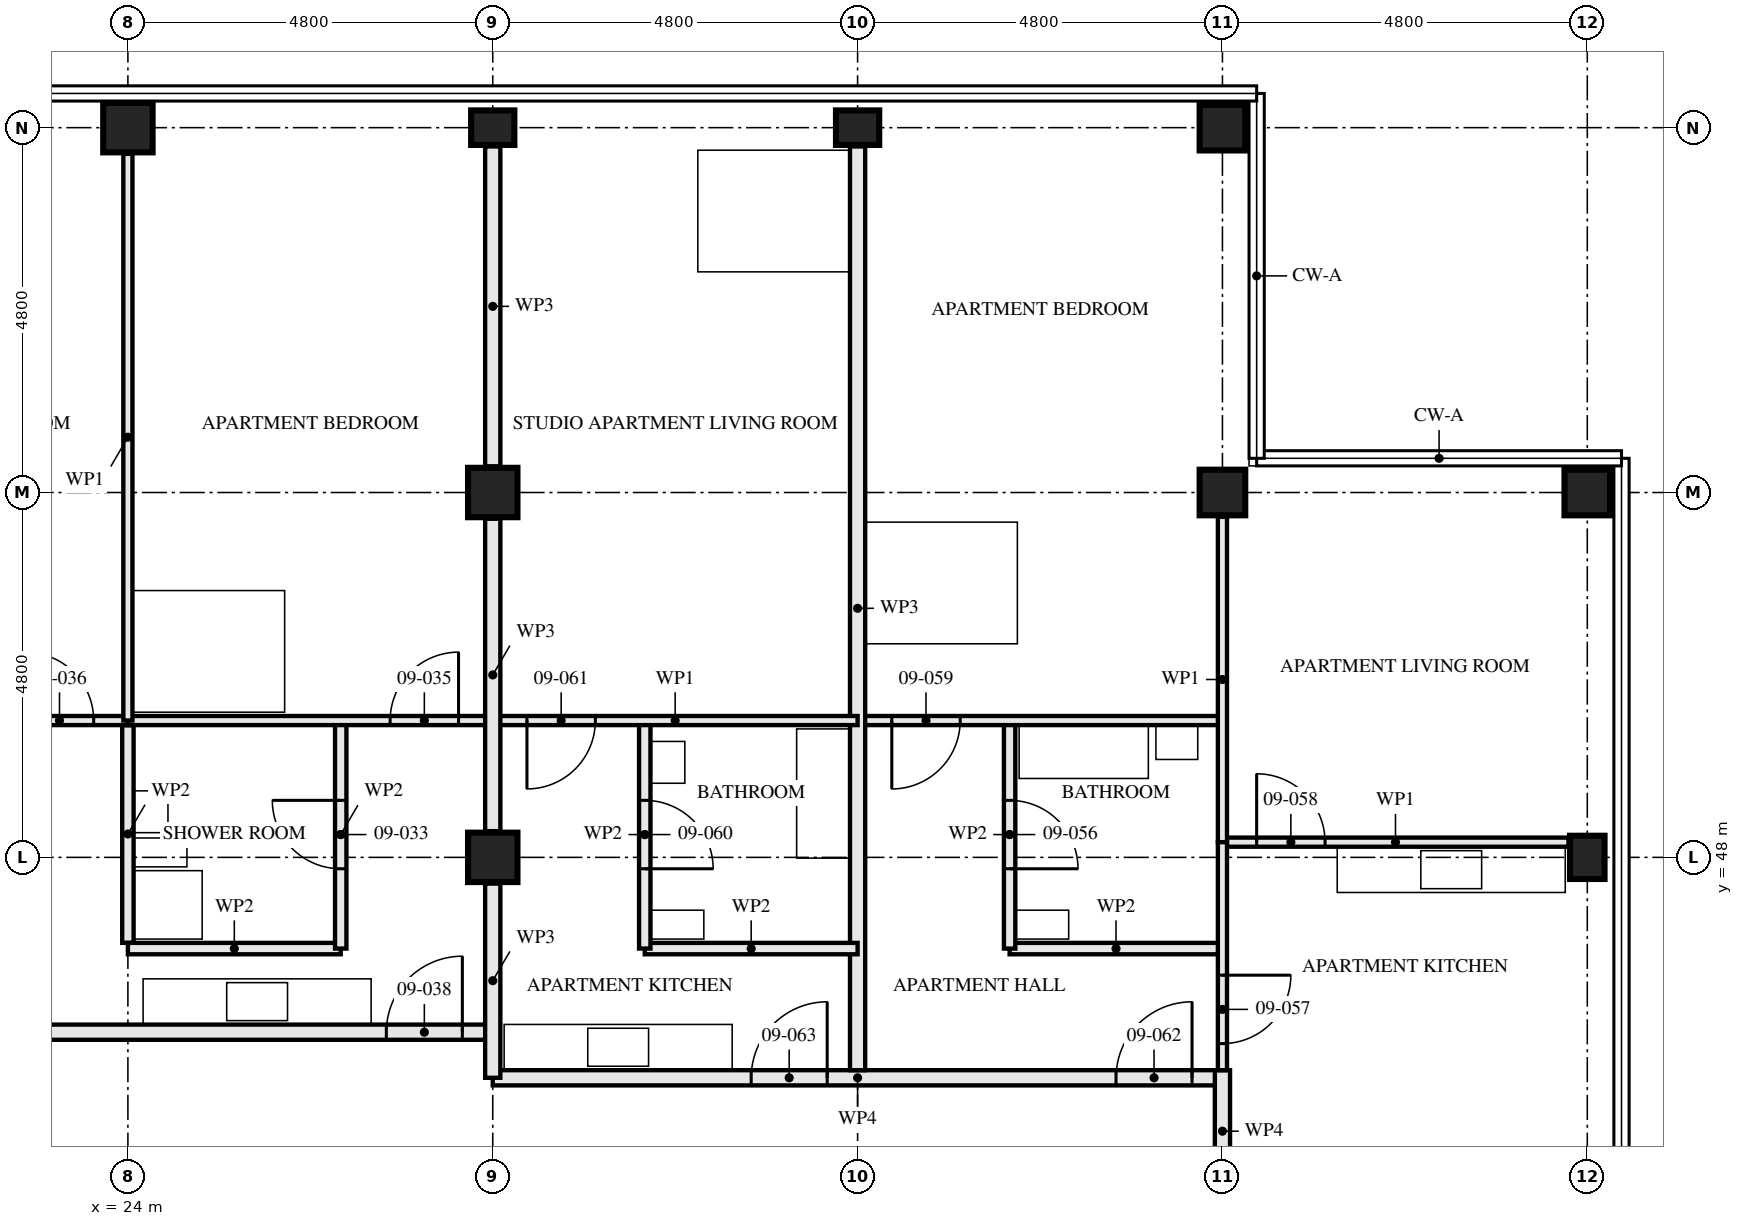
"""IFC4 building model, lengths in metres.
Left out: names, types, materials, properties, quantities, classifications, styles, units other than length and angle.
Written with IfcOpenShell. Run it as: python <this file> out.ifc"""

import sys

from ifc_helpers import new_model, si_unit, direction, frame, frame_2d, origin, origin_2d, place, context, subcontext, project, spatial, rectangle, hollow_rectangle, i_section, extrude, element, fill, save


model = new_model("IFC4")
c1 = context("Model", 3, precision=1e-05, world=origin(), true_north=direction((0.0, 1.0)))
c2 = subcontext(c1, "Body", "Model", "MODEL_VIEW")
j1 = project(units=[si_unit("LENGTHUNIT", "METRE"), si_unit("PLANEANGLEUNIT", "RADIAN")], contexts=[c1])
p1 = place(None, origin())
s1 = spatial("IfcSite", under=j1, at=p1, CompositionType="ELEMENT")
p2 = place(p1, origin())
s2 = spatial("IfcBuilding", under=s1, at=p2, CompositionType="ELEMENT")
p3 = place(p2, frame((0.0, 0.0, 37.5)))
s3 = spatial("IfcBuildingStorey", under=s2, at=p3, CompositionType="ELEMENT", Elevation=37.5)
p4 = place(p3, frame((24.0, 57.6, 0.0), z_axis=(0.0, 0.0, 1.0), x_axis=(0.0, 1.0, 0.0)))
e1 = element("IfcColumn", 1, at=p4, inside=s3, PredefinedType="COLUMN", context=c2, shape_type="SweptSolid", body=[
    extrude(hollow_rectangle(XDim=0.65, YDim=0.65, WallThickness=0.08, at=origin_2d()), origin(), (0.0, 0.0, 1.0), 3.5),
])
for number, where, z_axis, x_axis in (
    (2, (28.8, 48.0, 0.0), (0.0, 0.0, 1.0), (1.0, 0.0, 0.0)),
    (3, (28.8, 52.8, 0.0), (0.0, 0.0, 1.0), (1.0, 0.0, 0.0)),
):
    element("IfcColumn", number, at=place(p3, frame(where, z_axis=z_axis, x_axis=x_axis)), inside=s3, PredefinedType="COLUMN", context=c2, shape_type="SweptSolid", body=[
        extrude(hollow_rectangle(XDim=0.65, YDim=0.65, WallThickness=0.05, at=origin_2d()), origin(), (0.0, 0.0, 1.0), 3.5),
    ])
for number, where, z_axis, x_axis in (
    (4, (28.8, 57.6, 0.0), (0.0, 0.0, 1.0), (0.0, 1.0, 0.0)),
    (5, (33.6, 57.6, 0.0), (0.0, 0.0, 1.0), (0.0, 1.0, 0.0)),
):
    element("IfcColumn", number, at=place(p3, frame(where, z_axis=z_axis, x_axis=x_axis)), inside=s3, PredefinedType="COLUMN", context=c2, shape_type="SweptSolid", body=[
        extrude(i_section(OverallWidth=0.454, OverallDepth=0.569, WebThickness=0.078, FlangeThickness=0.125, FilletRadius=0.015, at=origin_2d()), origin(), (0.0, 0.0, 1.0), 3.5),
    ])
for number, where, z_axis, x_axis in (
    (6, (38.4, 52.8, 0.0), (0.0, 0.0, 1.0), (0.0, 1.0, 0.0)),
    (7, (38.4, 57.6, 0.0), (0.0, 0.0, 1.0), (0.0, 1.0, 0.0)),
):
    element("IfcColumn", number, at=place(p3, frame(where, z_axis=z_axis, x_axis=x_axis)), inside=s3, PredefinedType="COLUMN", context=c2, shape_type="SweptSolid", body=[
        extrude(hollow_rectangle(XDim=0.6, YDim=0.6, WallThickness=0.05, at=origin_2d()), origin(), (0.0, 0.0, 1.0), 3.5),
    ])
p5 = place(p3, frame((43.2, 48.0, 0.0), z_axis=(0.0, 0.0, 1.0), x_axis=(1.0, 0.0, 0.0)))
e8 = element("IfcColumn", 8, at=p5, inside=s3, PredefinedType="COLUMN", context=c2, shape_type="SweptSolid", body=[
    extrude(i_section(OverallWidth=0.454, OverallDepth=0.569, WebThickness=0.078, FlangeThickness=0.125, FilletRadius=0.015, at=origin_2d()), origin(), (0.0, 0.0, 1.0), 3.5),
])
p6 = place(p3, frame((43.2, 52.8, 0.0), z_axis=(0.0, 0.0, 1.0), x_axis=(0.0, 1.0, 0.0)))
e9 = element("IfcColumn", 9, at=p6, inside=s3, PredefinedType="COLUMN", context=c2, shape_type="SweptSolid", body=[
    extrude(hollow_rectangle(XDim=0.6, YDim=0.6, WallThickness=0.05, at=origin_2d()), origin(), (0.0, 0.0, 1.0), 3.5),
])
p7 = place(p3, frame((26.8, 49.8, 0.0), z_axis=(0.0, 0.0, 1.0), x_axis=(0.0, -1.0, 0.0)))
e10 = element("IfcWall", 10, at=p7, inside=s3, PredefinedType="PARTITIONING", context=c2, shape_type="SweptSolid", body=[
    extrude(rectangle(XDim=3.0, YDim=0.15, at=frame_2d((1.5, 0.0))), origin(), (0.0, 0.0, 1.0), 2.55),
])
p8 = place(p7, frame((1.05, 0.0, 0.0)))
e11 = element("IfcOpeningElement", 11, at=p8, cuts=e10, PredefinedType="OPENING", context=c2, shape_type="SweptSolid", body=[
    extrude(rectangle(XDim=0.9, YDim=2.1, at=frame_2d((0.45, 1.05))), frame((0.0, 0.085, 0.0), z_axis=(0.0, -1.0, 0.0), x_axis=(1.0, 0.0, 0.0)), (0.0, 0.0, 1.0), 0.171),
])
p9 = place(p3, frame((26.8, 46.8, 0.0), z_axis=(0.0, 0.0, 1.0), x_axis=(-1.0, 0.0, 0.0)))
e12 = element("IfcWall", 12, at=p9, inside=s3, PredefinedType="PARTITIONING", context=c2, shape_type="SweptSolid", body=[
    extrude(rectangle(XDim=2.8, YDim=0.15, at=frame_2d((1.4, 0.0))), origin(), (0.0, 0.0, 1.0), 3.33),
])
p10 = place(p3, frame((28.8, 49.8, 0.0), z_axis=(0.0, 0.0, 1.0), x_axis=(-1.0, 0.0, 0.0)))
e13 = element("IfcWall", 13, at=p10, inside=s3, PredefinedType="PARTITIONING", context=c2, shape_type="SweptSolid", body=[
    extrude(rectangle(XDim=4.8, YDim=0.12, at=frame_2d((2.4, 0.0))), origin(), (0.0, 0.0, 1.0), 3.33),
])
p11 = place(p10, frame((0.45, 0.0, 0.0)))
e14 = element("IfcOpeningElement", 14, at=p11, cuts=e13, PredefinedType="OPENING", context=c2, shape_type="SweptSolid", body=[
    extrude(rectangle(XDim=0.9, YDim=2.1, at=frame_2d((0.45, 1.05))), frame((0.0, 0.071, 0.0), z_axis=(0.0, -1.0, 0.0), x_axis=(1.0, 0.0, 0.0)), (0.0, 0.0, 1.0), 0.141),
])
p12 = place(p3, frame((24.0, 49.8, 0.0), z_axis=(0.0, 0.0, 1.0), x_axis=(-1.0, 0.0, 0.0)))
e15 = element("IfcWall", 15, at=p12, inside=s3, PredefinedType="PARTITIONING", context=c2, shape_type="SweptSolid", body=[
    extrude(rectangle(XDim=4.8, YDim=0.12, at=frame_2d((2.4, 0.0))), origin(), (0.0, 0.0, 1.0), 3.33),
])
p13 = place(p12, frame((0.45, 0.0, 0.0)))
e16 = element("IfcOpeningElement", 16, at=p13, cuts=e15, PredefinedType="OPENING", context=c2, shape_type="SweptSolid", body=[
    extrude(rectangle(XDim=0.9, YDim=2.1, at=frame_2d((0.45, 1.05))), frame((0.0, 0.071, 0.0), z_axis=(0.0, -1.0, 0.0), x_axis=(1.0, 0.0, 0.0)), (0.0, 0.0, 1.0), 0.141),
])
p14 = place(p3, frame((24.0, 57.255, 0.0), z_axis=(0.0, 0.0, 1.0), x_axis=(0.0, -1.0, 0.0)))
e17 = element("IfcWall", 17, at=p14, inside=s3, PredefinedType="PARTITIONING", context=c2, shape_type="SweptSolid", body=[
    extrude(rectangle(XDim=7.455, YDim=0.12, at=frame_2d((3.728, 0.0))), origin(), (0.0, 0.0, 1.0), 2.55),
])
p15 = place(p3, frame((28.8, 45.7, 0.0), z_axis=(0.0, 0.0, 1.0), x_axis=(-1.0, 0.0, 0.0)))
e18 = element("IfcWall", 18, at=p15, inside=s3, PredefinedType="PARTITIONING", context=c2, shape_type="SweptSolid", body=[
    extrude(rectangle(XDim=14.4, YDim=0.2, at=frame_2d((7.2, 0.0))), origin(), (0.0, 0.0, 1.0), 3.33),
])
p16 = place(p15, frame((0.4, 0.0, 0.0)))
e19 = element("IfcOpeningElement", 19, at=p16, cuts=e18, PredefinedType="OPENING", context=c2, shape_type="SweptSolid", body=[
    extrude(rectangle(XDim=1.0, YDim=2.1, at=frame_2d((0.5, 1.05))), frame((0.0, 0.111, 0.0), z_axis=(0.0, -1.0, 0.0), x_axis=(1.0, 0.0, 0.0)), (0.0, 0.0, 1.0), 0.221),
])
p17 = place(p3, frame((35.6, 49.8, 0.0), z_axis=(0.0, 0.0, 1.0), x_axis=(0.0, -1.0, 0.0)))
e20 = element("IfcWall", 20, at=p17, inside=s3, PredefinedType="PARTITIONING", context=c2, shape_type="SweptSolid", body=[
    extrude(rectangle(XDim=3.0, YDim=0.15, at=frame_2d((1.5, 0.0))), origin(), (0.0, 0.0, 1.0), 2.55),
])
p18 = place(p17, frame((1.05, 0.0, 0.0)))
e21 = element("IfcOpeningElement", 21, at=p18, cuts=e20, PredefinedType="OPENING", context=c2, shape_type="SweptSolid", body=[
    extrude(rectangle(XDim=0.9, YDim=2.1, at=frame_2d((0.45, 1.05))), frame((0.0, 0.085, 0.0), z_axis=(0.0, -1.0, 0.0), x_axis=(1.0, 0.0, 0.0)), (0.0, 0.0, 1.0), 0.171),
])
p19 = place(p3, frame((38.4, 46.8, 0.0), z_axis=(0.0, 0.0, 1.0), x_axis=(-1.0, 0.0, 0.0)))
e22 = element("IfcWall", 22, at=p19, inside=s3, PredefinedType="PARTITIONING", context=c2, shape_type="SweptSolid", body=[
    extrude(rectangle(XDim=2.8, YDim=0.15, at=frame_2d((1.4, 0.0))), origin(), (0.0, 0.0, 1.0), 3.33),
])
p20 = place(p3, frame((38.4, 48.2, 0.0), z_axis=(0.0, 0.0, 1.0), x_axis=(0.0, -1.0, 0.0)))
e23 = element("IfcWall", 23, at=p20, inside=s3, PredefinedType="PARTITIONING", context=c2, shape_type="SweptSolid", body=[
    extrude(rectangle(XDim=3.0, YDim=0.12, at=frame_2d((1.5, 0.0))), origin(), (0.0, 0.0, 1.0), 2.55),
])
p21 = place(p20, frame((1.75, 0.0, 0.0)))
e24 = element("IfcOpeningElement", 24, at=p21, cuts=e23, PredefinedType="OPENING", context=c2, shape_type="SweptSolid", body=[
    extrude(rectangle(XDim=0.9, YDim=2.1, at=frame_2d((0.45, 1.05))), frame((0.0, 0.071, 0.0), z_axis=(0.0, -1.0, 0.0), x_axis=(1.0, 0.0, 0.0)), (0.0, 0.0, 1.0), 0.141),
])
p22 = place(p3, frame((42.953, 48.2, 0.0), z_axis=(0.0, 0.0, 1.0), x_axis=(-1.0, 0.0, 0.0)))
e25 = element("IfcWall", 25, at=p22, inside=s3, PredefinedType="PARTITIONING", context=c2, shape_type="SweptSolid", body=[
    extrude(rectangle(XDim=4.553, YDim=0.12, at=frame_2d((2.276, 0.0))), origin(), (0.0, 0.0, 1.0), 3.33),
])
p23 = place(p22, frame((3.203, 0.0, 0.0)))
e26 = element("IfcOpeningElement", 26, at=p23, cuts=e25, PredefinedType="OPENING", context=c2, shape_type="SweptSolid", body=[
    extrude(rectangle(XDim=0.9, YDim=2.1, at=frame_2d((0.45, 1.05))), frame((0.0, 0.071, 0.0), z_axis=(0.0, -1.0, 0.0), x_axis=(1.0, 0.0, 0.0)), (0.0, 0.0, 1.0), 0.141),
])
p24 = place(p3, frame((38.4, 49.8, 0.0), z_axis=(0.0, 0.0, 1.0), x_axis=(-1.0, 0.0, 0.0)))
e27 = element("IfcWall", 27, at=p24, inside=s3, PredefinedType="PARTITIONING", context=c2, shape_type="SweptSolid", body=[
    extrude(rectangle(XDim=4.8, YDim=0.12, at=frame_2d((2.4, 0.0))), origin(), (0.0, 0.0, 1.0), 3.33),
])
p25 = place(p24, frame((3.45, 0.0, 0.0)))
e28 = element("IfcOpeningElement", 28, at=p25, cuts=e27, PredefinedType="OPENING", context=c2, shape_type="SweptSolid", body=[
    extrude(rectangle(XDim=0.9, YDim=2.1, at=frame_2d((0.45, 1.05))), frame((0.0, 0.071, 0.0), z_axis=(0.0, -1.0, 0.0), x_axis=(1.0, 0.0, 0.0)), (0.0, 0.0, 1.0), 0.141),
])
p26 = place(p3, frame((38.4, 52.48, 0.0), z_axis=(0.0, 0.0, 1.0), x_axis=(0.0, -1.0, 0.0)))
e29 = element("IfcWall", 29, at=p26, inside=s3, PredefinedType="PARTITIONING", context=c2, shape_type="SweptSolid", body=[
    extrude(rectangle(XDim=4.28, YDim=0.12, at=frame_2d((2.14, 0.0))), origin(), (0.0, 0.0, 1.0), 3.33),
])
p27 = place(p3, frame((33.6, 57.353, 0.0), z_axis=(0.0, 0.0, 1.0), x_axis=(0.0, -1.0, 0.0)))
e30 = element("IfcWall", 30, at=p27, inside=s3, PredefinedType="PARTITIONING", context=c2, shape_type="SweptSolid", body=[
    extrude(rectangle(XDim=12.153, YDim=0.2, at=frame_2d((6.077, 0.0))), origin(), (0.0, 0.0, 1.0), 2.55),
])
p28 = place(p3, frame((30.8, 49.8, 0.0), z_axis=(0.0, 0.0, 1.0), x_axis=(0.0, -1.0, 0.0)))
e31 = element("IfcWall", 31, at=p28, inside=s3, PredefinedType="PARTITIONING", context=c2, shape_type="SweptSolid", body=[
    extrude(rectangle(XDim=3.0, YDim=0.15, at=frame_2d((1.5, 0.0))), origin(), (0.0, 0.0, 1.0), 2.55),
])
p29 = place(p28, frame((1.05, 0.0, 0.0)))
e32 = element("IfcOpeningElement", 32, at=p29, cuts=e31, PredefinedType="OPENING", context=c2, shape_type="SweptSolid", body=[
    extrude(rectangle(XDim=0.9, YDim=2.1, at=frame_2d((0.45, 1.05))), frame((0.0, 0.085, 0.0), z_axis=(0.0, -1.0, 0.0), x_axis=(1.0, 0.0, 0.0)), (0.0, 0.0, 1.0), 0.171),
])
p30 = place(p3, frame((33.6, 46.8, 0.0), z_axis=(0.0, 0.0, 1.0), x_axis=(-1.0, 0.0, 0.0)))
e33 = element("IfcWall", 33, at=p30, inside=s3, PredefinedType="PARTITIONING", context=c2, shape_type="SweptSolid", body=[
    extrude(rectangle(XDim=2.8, YDim=0.15, at=frame_2d((1.4, 0.0))), origin(), (0.0, 0.0, 1.0), 3.33),
])
p31 = place(p3, frame((33.6, 49.8, 0.0), z_axis=(0.0, 0.0, 1.0), x_axis=(-1.0, 0.0, 0.0)))
e34 = element("IfcWall", 34, at=p31, inside=s3, PredefinedType="PARTITIONING", context=c2, shape_type="SweptSolid", body=[
    extrude(rectangle(XDim=4.8, YDim=0.12, at=frame_2d((2.4, 0.0))), origin(), (0.0, 0.0, 1.0), 3.33),
])
p32 = place(p31, frame((3.45, 0.0, 0.0)))
e35 = element("IfcOpeningElement", 35, at=p32, cuts=e34, PredefinedType="OPENING", context=c2, shape_type="SweptSolid", body=[
    extrude(rectangle(XDim=0.9, YDim=2.1, at=frame_2d((0.45, 1.05))), frame((0.0, 0.071, 0.0), z_axis=(0.0, -1.0, 0.0), x_axis=(1.0, 0.0, 0.0)), (0.0, 0.0, 1.0), 0.141),
])
p33 = place(p3, frame((38.4, 45.1, 0.0), z_axis=(0.0, 0.0, 1.0), x_axis=(-1.0, 0.0, 0.0)))
e36 = element("IfcWall", 36, at=p33, inside=s3, PredefinedType="PARTITIONING", context=c2, shape_type="SweptSolid", body=[
    extrude(rectangle(XDim=9.6, YDim=0.2, at=frame_2d((4.8, 0.0))), origin(), (0.0, 0.0, 1.0), 3.33),
])
p34 = place(p33, frame((0.4, 0.0, 0.0)))
e37 = element("IfcOpeningElement", 37, at=p34, cuts=e36, PredefinedType="OPENING", context=c2, shape_type="SweptSolid", body=[
    extrude(rectangle(XDim=1.0, YDim=2.1, at=frame_2d((0.5, 1.05))), frame((0.0, 0.111, 0.0), z_axis=(0.0, -1.0, 0.0), x_axis=(1.0, 0.0, 0.0)), (0.0, 0.0, 1.0), 0.221),
])
p35 = place(p33, frame((5.2, 0.0, 0.0)))
e38 = element("IfcOpeningElement", 38, at=p35, cuts=e36, PredefinedType="OPENING", context=c2, shape_type="SweptSolid", body=[
    extrude(rectangle(XDim=1.0, YDim=2.1, at=frame_2d((0.5, 1.05))), frame((0.0, 0.111, 0.0), z_axis=(0.0, -1.0, 0.0), x_axis=(1.0, 0.0, 0.0)), (0.0, 0.0, 1.0), 0.221),
])
p36 = place(p3, frame((38.4, 45.2, 0.0), z_axis=(0.0, 0.0, 1.0), x_axis=(0.0, -1.0, 0.0)))
e39 = element("IfcWall", 39, at=p36, inside=s3, PredefinedType="PARTITIONING", context=c2, shape_type="SweptSolid", body=[
    extrude(rectangle(XDim=1.605, YDim=0.2, at=frame_2d((0.802, 0.0))), origin(), (0.0, 0.0, 1.0), 3.33),
])
p37 = place(p3, frame((28.8, 45.1, 0.0), z_axis=(0.0, 0.0, 1.0), x_axis=(0.0, 1.0, 0.0)))
e40 = element("IfcWall", 40, at=p37, inside=s3, PredefinedType="PARTITIONING", context=c2, shape_type="SweptSolid", body=[
    extrude(rectangle(XDim=2.555, YDim=0.2, at=frame_2d((1.277, 0.0))), origin(), (0.0, 0.0, 1.0), 2.32),
])
p38 = place(p3, frame((28.8, 48.345, 0.0), z_axis=(0.0, 0.0, 1.0), x_axis=(0.0, 1.0, 0.0)))
e41 = element("IfcWall", 41, at=p38, inside=s3, PredefinedType="PARTITIONING", context=c2, shape_type="SweptSolid", body=[
    extrude(rectangle(XDim=4.11, YDim=0.2, at=frame_2d((2.055, 0.0))), origin(), (0.0, 0.0, 1.0), 2.32),
])
p39 = place(p3, frame((28.8, 53.145, 0.0), z_axis=(0.0, 0.0, 1.0), x_axis=(0.0, 1.0, 0.0)))
e42 = element("IfcWall", 42, at=p39, inside=s3, PredefinedType="PARTITIONING", context=c2, shape_type="SweptSolid", body=[
    extrude(rectangle(XDim=4.208, YDim=0.2, at=frame_2d((2.104, 0.0))), origin(), (0.0, 0.0, 1.0), 2.32),
])
p40 = place(p3, frame((24.0, 46.875, 0.0), z_axis=(0.0, 0.0, 1.0), x_axis=(0.0, 1.0, 0.0)))
e43 = element("IfcWall", 43, at=p40, inside=s3, PredefinedType="PARTITIONING", context=c2, shape_type="SweptSolid", body=[
    extrude(rectangle(XDim=2.865, YDim=0.15, at=frame_2d((1.433, 0.0))), origin(), (0.0, 0.0, 1.0), 2.55),
])
p41 = place(p8, frame((0.9, 0.0, 0.0), z_axis=(0.0, 0.0, 1.0), x_axis=(-1.0, 0.0, 0.0)))
e44 = element("IfcDoor", 44, at=p41, inside=s3, OperationType="SINGLE_SWING_LEFT", PredefinedType="DOOR", context=c2, shape_type="SweptSolid", body=[
    extrude(rectangle(XDim=0.9, YDim=2.1, at=frame_2d((0.45, 1.05))), frame((0.0, 0.022, 0.0), z_axis=(0.0, -1.0, 0.0), x_axis=(1.0, 0.0, 0.0)), (0.0, 0.0, 1.0), 0.044),
])
fill(e11, e44)
p42 = place(p11, frame((0.9, 0.0, 0.0), z_axis=(0.0, 0.0, 1.0), x_axis=(-1.0, 0.0, 0.0)))
e45 = element("IfcDoor", 45, at=p42, inside=s3, OperationType="SINGLE_SWING_LEFT", PredefinedType="DOOR", context=c2, shape_type="SweptSolid", body=[
    extrude(rectangle(XDim=0.9, YDim=2.1, at=frame_2d((0.45, 1.05))), frame((0.0, 0.022, 0.0), z_axis=(0.0, -1.0, 0.0), x_axis=(1.0, 0.0, 0.0)), (0.0, 0.0, 1.0), 0.044),
])
fill(e14, e45)
p43 = place(p13, frame((0.9, 0.0, 0.0), z_axis=(0.0, 0.0, 1.0), x_axis=(-1.0, 0.0, 0.0)))
e46 = element("IfcDoor", 46, at=p43, inside=s3, OperationType="SINGLE_SWING_RIGHT", PredefinedType="DOOR", context=c2, shape_type="SweptSolid", body=[
    extrude(rectangle(XDim=0.9, YDim=2.1, at=frame_2d((0.45, 1.05))), frame((0.0, 0.022, 0.0), z_axis=(0.0, -1.0, 0.0), x_axis=(1.0, 0.0, 0.0)), (0.0, 0.0, 1.0), 0.044),
])
fill(e16, e46)
p44 = place(p16, frame((1.0, 0.0, 0.0), z_axis=(0.0, 0.0, 1.0), x_axis=(-1.0, 0.0, 0.0)))
e47 = element("IfcDoor", 47, at=p44, inside=s3, OperationType="SINGLE_SWING_LEFT", PredefinedType="DOOR", context=c2, shape_type="SweptSolid", body=[
    extrude(rectangle(XDim=1.0, YDim=2.1, at=frame_2d((0.5, 1.05))), frame((0.0, 0.027, 0.0), z_axis=(0.0, -1.0, 0.0), x_axis=(1.0, 0.0, 0.0)), (0.0, 0.0, 1.0), 0.054),
])
fill(e19, e47)
p45 = place(p18, origin())
e48 = element("IfcDoor", 48, at=p45, inside=s3, OperationType="SINGLE_SWING_LEFT", PredefinedType="DOOR", context=c2, shape_type="SweptSolid", body=[
    extrude(rectangle(XDim=0.9, YDim=2.1, at=frame_2d((0.45, 1.05))), frame((0.0, 0.022, 0.0), z_axis=(0.0, -1.0, 0.0), x_axis=(1.0, 0.0, 0.0)), (0.0, 0.0, 1.0), 0.044),
])
fill(e21, e48)
p46 = place(p21, origin())
e49 = element("IfcDoor", 49, at=p46, inside=s3, OperationType="SINGLE_SWING_RIGHT", PredefinedType="DOOR", context=c2, shape_type="SweptSolid", body=[
    extrude(rectangle(XDim=0.9, YDim=2.1, at=frame_2d((0.45, 1.05))), frame((0.0, 0.022, 0.0), z_axis=(0.0, -1.0, 0.0), x_axis=(1.0, 0.0, 0.0)), (0.0, 0.0, 1.0), 0.044),
])
fill(e24, e49)
p47 = place(p23, frame((0.9, 0.0, 0.0), z_axis=(0.0, 0.0, 1.0), x_axis=(-1.0, 0.0, 0.0)))
e50 = element("IfcDoor", 50, at=p47, inside=s3, OperationType="SINGLE_SWING_RIGHT", PredefinedType="DOOR", context=c2, shape_type="SweptSolid", body=[
    extrude(rectangle(XDim=0.9, YDim=2.1, at=frame_2d((0.45, 1.05))), frame((0.0, 0.022, 0.0), z_axis=(0.0, -1.0, 0.0), x_axis=(1.0, 0.0, 0.0)), (0.0, 0.0, 1.0), 0.044),
])
fill(e26, e50)
p48 = place(p25, origin())
e51 = element("IfcDoor", 51, at=p48, inside=s3, OperationType="SINGLE_SWING_LEFT", PredefinedType="DOOR", context=c2, shape_type="SweptSolid", body=[
    extrude(rectangle(XDim=0.9, YDim=2.1, at=frame_2d((0.45, 1.05))), frame((0.0, 0.022, 0.0), z_axis=(0.0, -1.0, 0.0), x_axis=(1.0, 0.0, 0.0)), (0.0, 0.0, 1.0), 0.044),
])
fill(e28, e51)
p49 = place(p29, origin())
e52 = element("IfcDoor", 52, at=p49, inside=s3, OperationType="SINGLE_SWING_LEFT", PredefinedType="DOOR", context=c2, shape_type="SweptSolid", body=[
    extrude(rectangle(XDim=0.9, YDim=2.1, at=frame_2d((0.45, 1.05))), frame((0.0, 0.022, 0.0), z_axis=(0.0, -1.0, 0.0), x_axis=(1.0, 0.0, 0.0)), (0.0, 0.0, 1.0), 0.044),
])
fill(e32, e52)
p50 = place(p32, origin())
e53 = element("IfcDoor", 53, at=p50, inside=s3, OperationType="SINGLE_SWING_LEFT", PredefinedType="DOOR", context=c2, shape_type="SweptSolid", body=[
    extrude(rectangle(XDim=0.9, YDim=2.1, at=frame_2d((0.45, 1.05))), frame((0.0, 0.022, 0.0), z_axis=(0.0, -1.0, 0.0), x_axis=(1.0, 0.0, 0.0)), (0.0, 0.0, 1.0), 0.044),
])
fill(e35, e53)
p51 = place(p34, frame((1.0, 0.0, 0.0), z_axis=(0.0, 0.0, 1.0), x_axis=(-1.0, 0.0, 0.0)))
e54 = element("IfcDoor", 54, at=p51, inside=s3, OperationType="SINGLE_SWING_LEFT", PredefinedType="DOOR", context=c2, shape_type="SweptSolid", body=[
    extrude(rectangle(XDim=1.0, YDim=2.1, at=frame_2d((0.5, 1.05))), frame((0.0, 0.027, 0.0), z_axis=(0.0, -1.0, 0.0), x_axis=(1.0, 0.0, 0.0)), (0.0, 0.0, 1.0), 0.054),
])
fill(e37, e54)
p52 = place(p35, frame((1.0, 0.0, 0.0), z_axis=(0.0, 0.0, 1.0), x_axis=(-1.0, 0.0, 0.0)))
e55 = element("IfcDoor", 55, at=p52, inside=s3, OperationType="SINGLE_SWING_LEFT", PredefinedType="DOOR", context=c2, shape_type="SweptSolid", body=[
    extrude(rectangle(XDim=1.0, YDim=2.1, at=frame_2d((0.5, 1.05))), frame((0.0, 0.027, 0.0), z_axis=(0.0, -1.0, 0.0), x_axis=(1.0, 0.0, 0.0)), (0.0, 0.0, 1.0), 0.054),
])
fill(e38, e55)
save(model, sys.argv[1])
